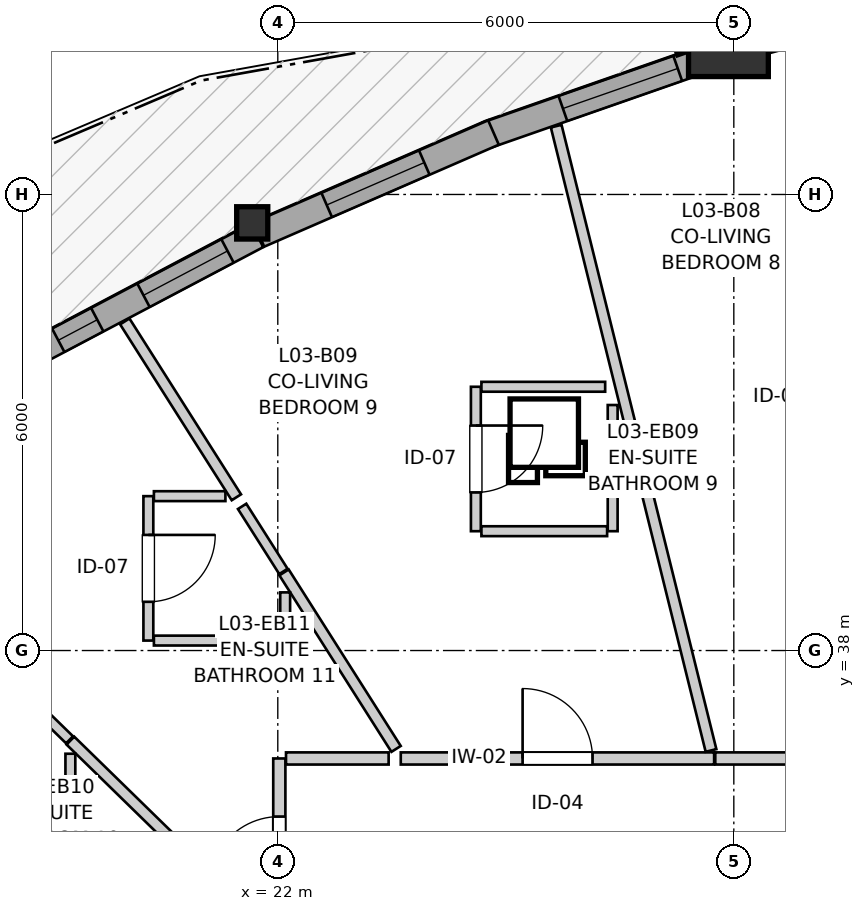
"""IFC4 building model, lengths in metres.
Left out: names, types, materials, properties, quantities, classifications, styles, units other than length and angle.
Written with IfcOpenShell. Run it as: python <this file> out.ifc"""

import sys

from ifc_helpers import new_model, si_unit, direction, frame, frame_2d, origin, origin_2d, place, context, subcontext, project, spatial, rectangle, i_section, extrude, source, transform, mapped, element, fill, save


model = new_model("IFC4")
c1 = context("Model", 3, precision=1e-05, world=origin(), true_north=direction((0.0, 1.0)))
c2 = subcontext(c1, "Body", "Model", "MODEL_VIEW")
j1 = project(units=[si_unit("LENGTHUNIT", "METRE"), si_unit("PLANEANGLEUNIT", "RADIAN")], contexts=[c1])
p1 = place(None, origin())
s1 = spatial("IfcSite", under=j1, at=p1, CompositionType="ELEMENT")
p2 = place(p1, origin())
s2 = spatial("IfcBuilding", under=s1, at=p2, CompositionType="ELEMENT")
p3 = place(p2, frame((0.0, 0.0, 14.2)))
s3 = spatial("IfcBuildingStorey", under=s2, at=p3, CompositionType="ELEMENT", Elevation=14.2)
m1 = source(origin(), c2, "Body", "SweptSolid", [
    extrude(rectangle(XDim=1.05, YDim=1.05, at=origin_2d()), origin(), (0.0, 0.0, 1.0), 2.94),
])
p4 = place(p3, frame((27.929, 46.076, 0.0), z_axis=(0.0, 0.0, 1.0), x_axis=(1.0, 0.0, 0.0)))
e1 = element("IfcColumn", 1, at=p4, inside=s3, PredefinedType="COLUMN", context=c2, shape_type="MappedRepresentation", body=[
    mapped(m1, transform((0.0, 0.0, 0.0), x_axis=(1.0, 0.0, 0.0), y_axis=(0.0, 1.0, 0.0), z_axis=(0.0, 0.0, 1.0), scale=1.0)),
])
m2 = source(origin(), c2, "Body", "SweptSolid", [
    extrude(i_section(OverallWidth=0.409, OverallDepth=0.425, WebThickness=0.03, FlangeThickness=0.048, FilletRadius=0.015, at=origin_2d()), origin(), (0.0, 0.0, 1.0), 2.94),
])
p5 = place(p3, frame((21.664, 43.626, 0.0), z_axis=(0.0, 0.0, 1.0), x_axis=(1.0, 0.0, 0.0)))
e2 = element("IfcColumn", 2, at=p5, inside=s3, PredefinedType="PILASTER", context=c2, shape_type="MappedRepresentation", body=[
    mapped(m2, transform((0.0, 0.0, 0.0), x_axis=(1.0, 0.0, 0.0), y_axis=(0.0, 1.0, 0.0), z_axis=(0.0, 0.0, 1.0), scale=1.0)),
])
p6 = place(p3, frame((31.333, 46.814, 0.0), z_axis=(0.0, 0.0, 1.0), x_axis=(-0.965456905924, -0.260562780926, 0.0)))
e3 = element("IfcWall", 3, at=p6, inside=s3, PredefinedType="SOLIDWALL", context=c2, shape_type="SweptSolid", body=[
    extrude(rectangle(XDim=3.179, YDim=0.35, at=frame_2d((1.59, 0.0))), origin(), (0.0, 0.0, 1.0), 2.42),
])
p7 = place(p6, frame((1.09, 0.0, 0.0)))
e4 = element("IfcOpeningElement", 4, at=p7, cuts=e3, PredefinedType="OPENING", context=c2, shape_type="SweptSolid", body=[
    extrude(rectangle(XDim=1.0, YDim=2.1, at=frame_2d((0.5, 1.05))), frame((0.0, 0.185, 0.0), z_axis=(0.0, -1.0, 0.0), x_axis=(1.0, 0.0, 0.0)), (0.0, 0.0, 1.0), 0.37),
])
p8 = place(p3, frame((27.703, 45.812, 0.0), z_axis=(0.0, 0.0, 1.0), x_axis=(-0.944149283204, -0.329518028377, 0.0)))
e5 = element("IfcWall", 5, at=p8, inside=s3, PredefinedType="SOLIDWALL", context=c2, shape_type="SweptSolid", body=[
    extrude(rectangle(XDim=3.123, YDim=0.35, at=frame_2d((1.562, 0.0))), origin(), (0.0, 0.0, 1.0), 2.42),
])
p9 = place(p8, frame((0.468, 0.0, 0.82)))
e6 = element("IfcOpeningElement", 6, at=p9, cuts=e5, PredefinedType="OPENING", context=c2, shape_type="SweptSolid", body=[
    extrude(rectangle(XDim=1.6, YDim=1.35, at=frame_2d((0.8, 0.675))), frame((0.0, 0.185, 0.0), z_axis=(0.0, -1.0, 0.0), x_axis=(1.0, 0.0, 0.0)), (0.0, 0.0, 1.0), 0.37),
])
p10 = place(p3, frame((24.838, 44.815, 0.0), z_axis=(0.0, 0.0, 1.0), x_axis=(-0.917087357706, -0.398686315712, 0.0)))
e7 = element("IfcWall", 7, at=p10, inside=s3, PredefinedType="SOLIDWALL", context=c2, shape_type="SweptSolid", body=[
    extrude(rectangle(XDim=3.365, YDim=0.35, at=frame_2d((1.683, 0.0))), origin(), (0.0, 0.0, 1.0), 2.42),
])
p11 = place(p10, frame((0.992, 0.0, 0.82)))
e8 = element("IfcOpeningElement", 8, at=p11, cuts=e7, PredefinedType="OPENING", context=c2, shape_type="SweptSolid", body=[
    extrude(rectangle(XDim=1.4, YDim=1.35, at=frame_2d((0.7, 0.675))), frame((0.0, 0.185, 0.0), z_axis=(0.0, -1.0, 0.0), x_axis=(1.0, 0.0, 0.0)), (0.0, 0.0, 1.0), 0.37),
])
p12 = place(p3, frame((21.728, 43.462, 0.0), z_axis=(0.0, 0.0, 1.0), x_axis=(-0.884404833282, -0.466720570435, 0.0)))
e9 = element("IfcWall", 9, at=p12, inside=s3, PredefinedType="SOLIDWALL", context=c2, shape_type="SweptSolid", body=[
    extrude(rectangle(XDim=3.346, YDim=0.35, at=frame_2d((1.673, 0.0))), origin(), (0.0, 0.0, 1.0), 2.42),
])
p13 = place(p12, frame((0.44, 0.0, 0.82)))
e10 = element("IfcOpeningElement", 10, at=p13, cuts=e9, PredefinedType="OPENING", context=c2, shape_type="SweptSolid", body=[
    extrude(rectangle(XDim=1.25, YDim=1.35, at=frame_2d((0.625, 0.675))), frame((0.0, 0.185, 0.0), z_axis=(0.0, -1.0, 0.0), x_axis=(1.0, 0.0, 0.0)), (0.0, 0.0, 1.0), 0.37),
])
p14 = place(p12, frame((2.378, 0.0, 0.82)))
e11 = element("IfcOpeningElement", 11, at=p14, cuts=e9, PredefinedType="OPENING", context=c2, shape_type="SweptSolid", body=[
    extrude(rectangle(XDim=0.58, YDim=1.35, at=frame_2d((0.29, 0.675))), frame((0.0, 0.185, 0.0), z_axis=(0.0, -1.0, 0.0), x_axis=(1.0, 0.0, 0.0)), (0.0, 0.0, 1.0), 0.37),
])
p15 = place(p3, frame((23.618, 36.58, 0.0), z_axis=(0.0, 0.0, 1.0), x_axis=(1.0, 0.0, 0.0)))
e12 = element("IfcWall", 12, at=p15, inside=s3, PredefinedType="PARTITIONING", context=c2, shape_type="SweptSolid", body=[
    extrude(rectangle(XDim=4.123, YDim=0.16, at=frame_2d((2.062, 0.0))), origin(), (0.0, 0.0, 1.0), 2.548),
])
p16 = place(p15, frame((1.603, 0.0, 0.0)))
e13 = element("IfcOpeningElement", 13, at=p16, cuts=e12, PredefinedType="OPENING", context=c2, shape_type="SweptSolid", body=[
    extrude(rectangle(XDim=0.92, YDim=2.1, at=frame_2d((0.46, 1.05))), frame((0.0, 0.09, 0.0), z_axis=(0.0, -1.0, 0.0), x_axis=(1.0, 0.0, 0.0)), (0.0, 0.0, 1.0), 0.18),
])
p17 = place(p3, frame((27.756, 36.58, 0.0), z_axis=(0.0, 0.0, 1.0), x_axis=(1.0, 0.0, 0.0)))
e14 = element("IfcWall", 14, at=p17, inside=s3, PredefinedType="PARTITIONING", context=c2, shape_type="SweptSolid", body=[
    extrude(rectangle(XDim=3.07, YDim=0.16, at=frame_2d((1.535, 0.0))), origin(), (0.0, 0.0, 1.0), 2.94),
])
p18 = place(p17, frame((1.052, 0.0, 0.0)))
e15 = element("IfcOpeningElement", 15, at=p18, cuts=e14, PredefinedType="OPENING", context=c2, shape_type="SweptSolid", body=[
    extrude(rectangle(XDim=0.92, YDim=2.1, at=frame_2d((0.46, 1.05))), frame((0.0, 0.09, 0.0), z_axis=(0.0, -1.0, 0.0), x_axis=(1.0, 0.0, 0.0)), (0.0, 0.0, 1.0), 0.18),
])
p19 = place(p3, frame((22.02, 34.167, 0.0), z_axis=(0.0, 0.0, 1.0), x_axis=(0.0, 1.0, 0.0)))
e16 = element("IfcWall", 16, at=p19, inside=s3, PredefinedType="PARTITIONING", context=c2, shape_type="SweptSolid", body=[
    extrude(rectangle(XDim=2.413, YDim=0.16, at=frame_2d((1.207, 0.0))), origin(), (0.0, 0.0, 1.0), 2.94),
])
p20 = place(p19, frame((0.729, 0.0, 0.0)))
e17 = element("IfcOpeningElement", 17, at=p20, cuts=e16, PredefinedType="OPENING", context=c2, shape_type="SweptSolid", body=[
    extrude(rectangle(XDim=0.92, YDim=2.1, at=frame_2d((0.46, 1.05))), frame((0.0, 0.09, 0.0), z_axis=(0.0, -1.0, 0.0), x_axis=(1.0, 0.0, 0.0)), (0.0, 0.0, 1.0), 0.18),
])
p21 = place(p3, frame((24.606, 41.47, 0.0), z_axis=(0.0, 0.0, 1.0), x_axis=(0.0, -1.0, 0.0)))
e18 = element("IfcWall", 18, at=p21, inside=s3, PredefinedType="PARTITIONING", context=c2, shape_type="SweptSolid", body=[
    extrude(rectangle(XDim=1.9, YDim=0.13, at=frame_2d((0.95, 0.0))), origin(), (0.0, 0.0, 1.0), 2.94),
])
p22 = place(p21, frame((0.51, 0.0, 0.0)))
e19 = element("IfcOpeningElement", 19, at=p22, cuts=e18, PredefinedType="OPENING", context=c2, shape_type="SweptSolid", body=[
    extrude(rectangle(XDim=0.88, YDim=2.05, at=frame_2d((0.44, 1.025))), frame((0.0, 0.075, 0.0), z_axis=(0.0, -1.0, 0.0), x_axis=(1.0, 0.0, 0.0)), (0.0, 0.0, 1.0), 0.15),
])
p23 = place(p3, frame((20.297, 40.031, 0.0), z_axis=(0.0, 0.0, 1.0), x_axis=(0.0, -1.0, 0.0)))
e20 = element("IfcWall", 20, at=p23, inside=s3, PredefinedType="PARTITIONING", context=c2, shape_type="SweptSolid", body=[
    extrude(rectangle(XDim=1.9, YDim=0.13, at=frame_2d((0.95, 0.0))), origin(), (0.0, 0.0, 1.0), 2.94),
])
p24 = place(p23, frame((0.51, 0.0, 0.0)))
e21 = element("IfcOpeningElement", 21, at=p24, cuts=e20, PredefinedType="OPENING", context=c2, shape_type="SweptSolid", body=[
    extrude(rectangle(XDim=0.88, YDim=2.05, at=frame_2d((0.44, 1.025))), frame((0.0, 0.075, 0.0), z_axis=(0.0, -1.0, 0.0), x_axis=(1.0, 0.0, 0.0)), (0.0, 0.0, 1.0), 0.15),
])
p25 = place(p3, frame((12.829, 37.479, 0.0), z_axis=(0.0, 0.0, 1.0), x_axis=(0.836435846472, -0.548064845376, 0.0)))
e22 = element("IfcWall", 22, at=p25, inside=s3, PredefinedType="PARTITIONING", context=c2, shape_type="SweptSolid", body=[
    extrude(rectangle(XDim=10.838, YDim=0.145, at=frame_2d((5.419, 0.0))), origin(), (0.0, 0.0, 1.0), 2.94),
])
p26 = place(p3, frame((25.663, 44.899, 0.0), z_axis=(0.0, 0.0, 1.0), x_axis=(0.240695577024, -0.970600658974, 0.0)))
e23 = element("IfcWall", 23, at=p26, inside=s3, PredefinedType="PARTITIONING", context=c2, shape_type="SweptSolid", body=[
    extrude(rectangle(XDim=8.462, YDim=0.145, at=frame_2d((4.231, 0.0))), origin(), (0.0, 0.0, 1.0), 2.94),
])
p27 = place(p3, frame((19.271, 36.815, 0.0), z_axis=(0.0, 0.0, 1.0), x_axis=(0.71551452036, -0.698597860828, 0.0)))
e24 = element("IfcWall", 24, at=p27, inside=s3, PredefinedType="PARTITIONING", context=c2, shape_type="SweptSolid", body=[
    extrude(rectangle(XDim=3.651, YDim=0.145, at=frame_2d((1.826, 0.0))), origin(), (0.0, 0.0, 1.0), 2.308),
])
p28 = place(p3, frame((22.082, 39.028, 0.0), z_axis=(0.0, 0.0, 1.0), x_axis=(0.535944885386, -0.844252971465, 0.0)))
e25 = element("IfcWall", 25, at=p28, inside=s3, PredefinedType="PARTITIONING", context=c2, shape_type="SweptSolid", body=[
    extrude(rectangle(XDim=2.751, YDim=0.145, at=frame_2d((1.375, 0.0))), origin(), (0.0, 0.0, 1.0), 2.94),
])
p29 = place(p3, frame((19.987, 42.33, 0.0), z_axis=(0.0, 0.0, 1.0), x_axis=(0.535808561115, -0.844339496788, 0.0)))
e26 = element("IfcWall", 26, at=p29, inside=s3, PredefinedType="PARTITIONING", context=c2, shape_type="SweptSolid", body=[
    extrude(rectangle(XDim=2.74, YDim=0.145, at=frame_2d((1.37, 0.0))), origin(), (0.0, 0.0, 1.0), 2.94),
])
p30 = place(p3, frame((26.406, 39.57, 0.0), z_axis=(0.0, 0.0, 1.0), x_axis=(0.0, 1.0, 0.0)))
e27 = element("IfcWall", 27, at=p30, inside=s3, PredefinedType="PARTITIONING", context=c2, shape_type="SweptSolid", body=[
    extrude(rectangle(XDim=1.66, YDim=0.13, at=frame_2d((0.83, 0.0))), origin(), (0.0, 0.0, 1.0), 2.94),
])
p31 = place(p3, frame((17.544, 36.125, 0.0), z_axis=(0.0, 0.0, 1.0), x_axis=(1.0, 0.0, 0.0)))
e28 = element("IfcWall", 28, at=p31, inside=s3, PredefinedType="PARTITIONING", context=c2, shape_type="SweptSolid", body=[
    extrude(rectangle(XDim=1.727, YDim=0.13, at=frame_2d((0.864, 0.0))), origin(), (0.0, 0.0, 1.0), 2.94),
])
p32 = place(p3, frame((20.37, 38.131, 0.0), z_axis=(0.0, 0.0, 1.0), x_axis=(1.0, 0.0, 0.0)))
e29 = element("IfcWall", 29, at=p32, inside=s3, PredefinedType="PARTITIONING", context=c2, shape_type="SweptSolid", body=[
    extrude(rectangle(XDim=1.727, YDim=0.13, at=frame_2d((0.863, 0.0))), origin(), (0.0, 0.0, 1.0), 2.94),
])
p33 = place(p3, frame((24.679, 41.47, 0.0), z_axis=(0.0, 0.0, 1.0), x_axis=(1.0, 0.0, 0.0)))
e30 = element("IfcWall", 30, at=p33, inside=s3, PredefinedType="PARTITIONING", context=c2, shape_type="SweptSolid", body=[
    extrude(rectangle(XDim=1.628, YDim=0.13, at=frame_2d((0.814, 0.0))), origin(), (0.0, 0.0, 1.0), 2.508),
])
p34 = place(p3, frame((24.679, 39.57, 0.0), z_axis=(0.0, 0.0, 1.0), x_axis=(1.0, 0.0, 0.0)))
e31 = element("IfcWall", 31, at=p34, inside=s3, PredefinedType="PARTITIONING", context=c2, shape_type="SweptSolid", body=[
    extrude(rectangle(XDim=1.654, YDim=0.13, at=frame_2d((0.827, 0.0))), origin(), (0.0, 0.0, 1.0), 2.94),
])
p35 = place(p3, frame((18.042, 38.014, 0.0), z_axis=(0.0, 0.0, 1.0), x_axis=(0.715729497461, -0.698377610225, 0.0)))
e32 = element("IfcWall", 32, at=p35, inside=s3, PredefinedType="PARTITIONING", context=c2, shape_type="SweptSolid", body=[
    extrude(rectangle(XDim=1.702, YDim=0.13, at=frame_2d((0.851, 0.0))), origin(), (0.0, 0.0, 1.0), 2.308),
])
p36 = place(p3, frame((22.108, 36.58, 0.0), z_axis=(0.0, 0.0, 1.0), x_axis=(1.0, 0.0, 0.0)))
e33 = element("IfcWall", 33, at=p36, inside=s3, PredefinedType="PARTITIONING", context=c2, shape_type="SweptSolid", body=[
    extrude(rectangle(XDim=1.35, YDim=0.16, at=frame_2d((0.675, 0.0))), origin(), (0.0, 0.0, 1.0), 2.94),
])
p37 = place(p3, frame((20.37, 40.031, 0.0), z_axis=(0.0, 0.0, 1.0), x_axis=(1.0, 0.0, 0.0)))
e34 = element("IfcWall", 34, at=p37, inside=s3, PredefinedType="PARTITIONING", context=c2, shape_type="SweptSolid", body=[
    extrude(rectangle(XDim=0.941, YDim=0.13, at=frame_2d((0.47, 0.0))), origin(), (0.0, 0.0, 1.0), 2.94),
])
p38 = place(p3, frame((21.531, 39.897, 0.0), z_axis=(0.0, 0.0, 1.0), x_axis=(0.536002688679, -0.844216274262, 0.0)))
e35 = element("IfcWall", 35, at=p38, inside=s3, PredefinedType="PARTITIONING", context=c2, shape_type="SweptSolid", body=[
    extrude(rectangle(XDim=1.014, YDim=0.13, at=frame_2d((0.507, 0.0))), origin(), (0.0, 0.0, 1.0), 2.94),
])
p39 = place(p3, frame((22.097, 38.204, 0.0), z_axis=(0.0, 0.0, 1.0), x_axis=(0.0, 1.0, 0.0)))
e36 = element("IfcWall", 36, at=p39, inside=s3, PredefinedType="PARTITIONING", context=c2, shape_type="SweptSolid", body=[
    extrude(rectangle(XDim=0.561, YDim=0.13, at=frame_2d((0.28, 0.0))), origin(), (0.0, 0.0, 1.0), 2.94),
])
p40 = place(p3, frame((19.271, 36.198, 0.0), z_axis=(0.0, 0.0, 1.0), x_axis=(0.0, 1.0, 0.0)))
e37 = element("IfcWall", 37, at=p40, inside=s3, PredefinedType="PARTITIONING", context=c2, shape_type="SweptSolid", body=[
    extrude(rectangle(XDim=0.444, YDim=0.13, at=frame_2d((0.222, 0.0))), origin(), (0.0, 0.0, 1.0), 2.94),
])
m3 = source(origin(), c2, "Body", "SweptSolid", [
    extrude(rectangle(XDim=1.6, YDim=1.35, at=frame_2d((0.8, 0.675))), frame((0.0, 0.03, 0.0), z_axis=(0.0, -1.0, 0.0), x_axis=(1.0, 0.0, 0.0)), (0.0, 0.0, 1.0), 0.06),
])
p41 = place(p9, origin())
e38 = element("IfcWindow", 38, at=p41, inside=s3, PartitioningType="SINGLE_PANEL", PredefinedType="WINDOW", context=c2, shape_type="MappedRepresentation", body=[
    mapped(m3, transform((0.0, 0.0, 0.0), x_axis=(1.0, 0.0, 0.0), y_axis=(0.0, 1.0, 0.0), z_axis=(0.0, 0.0, 1.0), scale=1.0)),
])
fill(e6, e38)
m4 = source(origin(), c2, "Body", "SweptSolid", [
    extrude(rectangle(XDim=1.4, YDim=1.35, at=frame_2d((0.7, 0.675))), frame((0.0, 0.03, 0.0), z_axis=(0.0, -1.0, 0.0), x_axis=(1.0, 0.0, 0.0)), (0.0, 0.0, 1.0), 0.06),
])
p42 = place(p11, origin())
e39 = element("IfcWindow", 39, at=p42, inside=s3, PartitioningType="SINGLE_PANEL", PredefinedType="WINDOW", context=c2, shape_type="MappedRepresentation", body=[
    mapped(m4, transform((0.0, 0.0, 0.0), x_axis=(1.0, 0.0, 0.0), y_axis=(0.0, 1.0, 0.0), z_axis=(0.0, 0.0, 1.0), scale=1.0)),
])
fill(e8, e39)
m5 = source(origin(), c2, "Body", "SweptSolid", [
    extrude(rectangle(XDim=1.25, YDim=1.35, at=frame_2d((0.625, 0.675))), frame((0.0, 0.03, 0.0), z_axis=(0.0, -1.0, 0.0), x_axis=(1.0, 0.0, 0.0)), (0.0, 0.0, 1.0), 0.06),
])
p43 = place(p13, origin())
e40 = element("IfcWindow", 40, at=p43, inside=s3, PartitioningType="SINGLE_PANEL", PredefinedType="WINDOW", context=c2, shape_type="MappedRepresentation", body=[
    mapped(m5, transform((0.0, 0.0, 0.0), x_axis=(1.0, 0.0, 0.0), y_axis=(0.0, 1.0, 0.0), z_axis=(0.0, 0.0, 1.0), scale=1.0)),
])
fill(e10, e40)
m6 = source(origin(), c2, "Body", "SweptSolid", [
    extrude(rectangle(XDim=0.58, YDim=1.35, at=frame_2d((0.29, 0.675))), frame((0.0, 0.03, 0.0), z_axis=(0.0, -1.0, 0.0), x_axis=(1.0, 0.0, 0.0)), (0.0, 0.0, 1.0), 0.06),
])
p44 = place(p14, origin())
e41 = element("IfcWindow", 41, at=p44, inside=s3, PartitioningType="SINGLE_PANEL", PredefinedType="WINDOW", context=c2, shape_type="MappedRepresentation", body=[
    mapped(m6, transform((0.0, 0.0, 0.0), x_axis=(1.0, 0.0, 0.0), y_axis=(0.0, 1.0, 0.0), z_axis=(0.0, 0.0, 1.0), scale=1.0)),
])
fill(e11, e41)
m7 = source(origin(), c2, "Body", "SweptSolid", [
    extrude(rectangle(XDim=0.92, YDim=2.1, at=frame_2d((0.46, 1.05))), frame((0.0, 0.025, 0.0), z_axis=(0.0, -1.0, 0.0), x_axis=(1.0, 0.0, 0.0)), (0.0, 0.0, 1.0), 0.05),
])
p45 = place(p16, origin())
e42 = element("IfcDoor", 42, at=p45, inside=s3, OperationType="SINGLE_SWING_LEFT", PredefinedType="DOOR", context=c2, shape_type="MappedRepresentation", body=[
    mapped(m7, transform((0.0, 0.0, 0.0), x_axis=(1.0, 0.0, 0.0), y_axis=(0.0, 1.0, 0.0), z_axis=(0.0, 0.0, 1.0), scale=1.0)),
])
fill(e13, e42)
p46 = place(p20, origin())
e43 = element("IfcDoor", 43, at=p46, inside=s3, OperationType="SINGLE_SWING_LEFT", PredefinedType="DOOR", context=c2, shape_type="MappedRepresentation", body=[
    mapped(m7, transform((0.0, 0.0, 0.0), x_axis=(1.0, 0.0, 0.0), y_axis=(0.0, 1.0, 0.0), z_axis=(0.0, 0.0, 1.0), scale=1.0)),
])
fill(e17, e43)
m8 = source(origin(), c2, "Body", "SweptSolid", [
    extrude(rectangle(XDim=0.88, YDim=2.05, at=frame_2d((0.44, 1.025))), frame((0.0, 0.025, 0.0), z_axis=(0.0, -1.0, 0.0), x_axis=(1.0, 0.0, 0.0)), (0.0, 0.0, 1.0), 0.05),
])
p47 = place(p22, origin())
e44 = element("IfcDoor", 44, at=p47, inside=s3, OperationType="SINGLE_SWING_LEFT", PredefinedType="DOOR", context=c2, shape_type="MappedRepresentation", body=[
    mapped(m8, transform((0.0, 0.0, 0.0), x_axis=(1.0, 0.0, 0.0), y_axis=(0.0, 1.0, 0.0), z_axis=(0.0, 0.0, 1.0), scale=1.0)),
])
fill(e19, e44)
p48 = place(p24, origin())
e45 = element("IfcDoor", 45, at=p48, inside=s3, OperationType="SINGLE_SWING_LEFT", PredefinedType="DOOR", context=c2, shape_type="MappedRepresentation", body=[
    mapped(m8, transform((0.0, 0.0, 0.0), x_axis=(1.0, 0.0, 0.0), y_axis=(0.0, 1.0, 0.0), z_axis=(0.0, 0.0, 1.0), scale=1.0)),
])
fill(e21, e45)
save(model, sys.argv[1])
